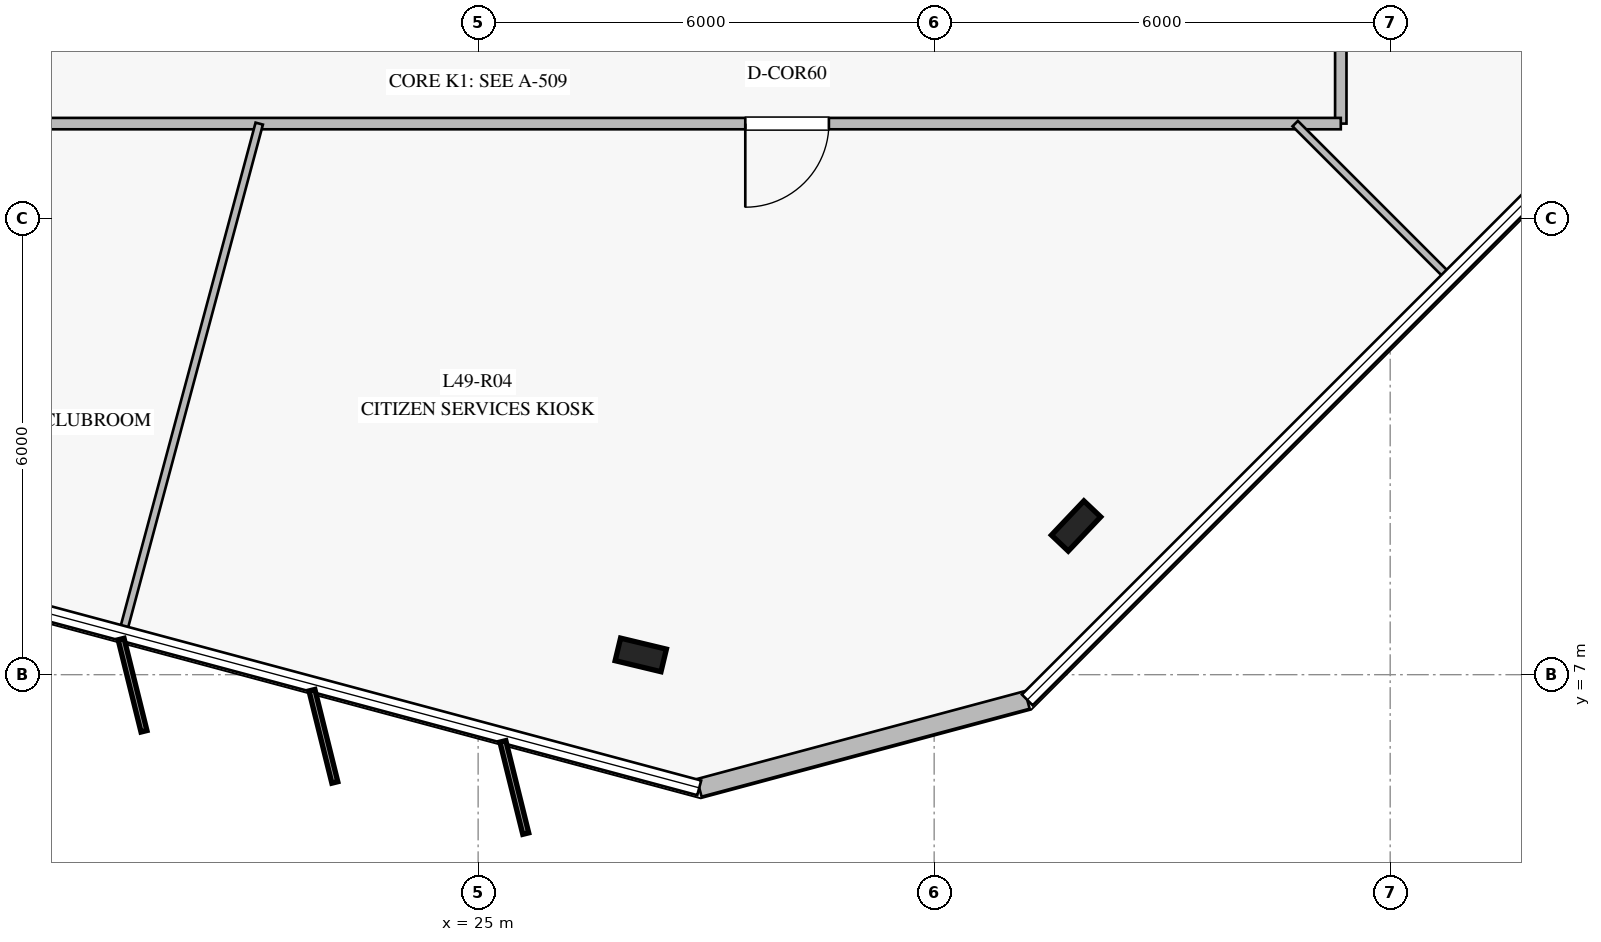
"""IFC4 building model, lengths in metres.
Left out: names, types, materials, properties, quantities, classifications, styles, units other than length and angle.
Written with IfcOpenShell. Run it as: python <this file> out.ifc"""

import sys

from ifc_helpers import new_model, si_unit, direction, frame, frame_2d, origin, origin_2d, place, context, subcontext, project, spatial, rectangle, i_section, extrude, element, fill, save


model = new_model("IFC4")
c1 = context("Model", 3, precision=1e-05, world=origin(), true_north=direction((0.0, 1.0)))
c2 = subcontext(c1, "Body", "Model", "MODEL_VIEW")
j1 = project(units=[si_unit("LENGTHUNIT", "METRE"), si_unit("PLANEANGLEUNIT", "RADIAN")], contexts=[c1])
p1 = place(None, origin())
s1 = spatial("IfcSite", under=j1, at=p1, CompositionType="ELEMENT")
p2 = place(p1, origin())
s2 = spatial("IfcBuilding", under=s1, at=p2, CompositionType="ELEMENT")
p3 = place(p2, frame((0.0, 0.0, 204.8)))
s3 = spatial("IfcBuildingStorey", under=s2, at=p3, CompositionType="ELEMENT", Elevation=204.8)
for number, where, z_axis, x_axis in (
    (1, (27.14, 7.26, 0.0), (0.0, 0.0, 1.0), (-0.972, 0.233, 0.0)),
    (2, (32.867, 8.956, 0.0), (0.0, 0.0, 1.0), (0.688, 0.725, 0.0)),
):
    element("IfcColumn", number, at=place(p3, frame(where, z_axis=z_axis, x_axis=x_axis)), inside=s3, PredefinedType="COLUMN", context=c2, shape_type="SweptSolid", body=[
        extrude(i_section(OverallWidth=0.305, OverallDepth=0.62, WebThickness=0.021, FlangeThickness=0.04, at=origin_2d()), origin(), (0.0, 0.0, 1.0), 4.0),
    ])
p4 = place(p3, frame((27.909, 5.511, 0.0), z_axis=(0.0, 0.0, 1.0), x_axis=(0.965899511245, 0.258917234221, 0.0)))
e3 = element("IfcWall", 3, at=p4, inside=s3, PredefinedType="STANDARD", context=c2, shape_type="SweptSolid", body=[
    extrude(rectangle(XDim=4.469, YDim=0.24, at=frame_2d((2.234, 0.0))), origin(), (0.0, 0.0, 1.0), 3.78),
])
p5 = place(p3, frame((36.35, 35.75, 0.0), z_axis=(0.0, 0.0, 1.0), x_axis=(0.0, -1.0, 0.0)))
e4 = element("IfcWall", 4, at=p5, inside=s3, PredefinedType="PARTITIONING", context=c2, shape_type="SweptSolid", body=[
    extrude(rectangle(XDim=21.5, YDim=0.15, at=frame_2d((10.75, 0.0))), origin(), (0.0, 0.0, 1.0), 3.05),
])
p6 = place(p5, frame((14.717, 0.0, 0.0)))
e5 = element("IfcOpeningElement", 5, at=p6, cuts=e4, PredefinedType="OPENING", context=c2, shape_type="SweptSolid", body=[
    extrude(rectangle(XDim=1.1, YDim=2.2, at=frame_2d((0.55, 1.1))), frame((0.0, 0.085, 0.0), z_axis=(0.0, -1.0, 0.0), x_axis=(1.0, 0.0, 0.0)), (0.0, 0.0, 1.0), 0.17),
])
p7 = place(p3, frame((36.35, 14.25, 0.0), z_axis=(0.0, 0.0, 1.0), x_axis=(-1.0, 0.0, 0.0)))
e6 = element("IfcWall", 6, at=p7, inside=s3, PredefinedType="PARTITIONING", context=c2, shape_type="SweptSolid", body=[
    extrude(rectangle(XDim=22.7, YDim=0.15, at=frame_2d((11.35, 0.0))), origin(), (0.0, 0.0, 1.0), 3.05),
])
p8 = place(p7, frame((17.741, 0.0, 0.0)))
e7 = element("IfcOpeningElement", 7, at=p8, cuts=e6, PredefinedType="OPENING", context=c2, shape_type="SweptSolid", body=[
    extrude(rectangle(XDim=1.1, YDim=2.2, at=frame_2d((0.55, 1.1))), frame((0.0, 0.085, 0.0), z_axis=(0.0, -1.0, 0.0), x_axis=(1.0, 0.0, 0.0)), (0.0, 0.0, 1.0), 0.17),
])
p9 = place(p7, frame((6.735, 0.0, 0.0)))
e8 = element("IfcOpeningElement", 8, at=p9, cuts=e6, PredefinedType="OPENING", context=c2, shape_type="SweptSolid", body=[
    extrude(rectangle(XDim=1.1, YDim=2.2, at=frame_2d((0.55, 1.1))), frame((0.0, 0.085, 0.0), z_axis=(0.0, -1.0, 0.0), x_axis=(1.0, 0.0, 0.0)), (0.0, 0.0, 1.0), 0.17),
])
p10 = place(p3, frame((22.12, 14.25, 0.0), z_axis=(0.0, 0.0, 1.0), x_axis=(-0.258906402321, -0.965902414759, 0.0)))
e9 = element("IfcWall", 9, at=p10, inside=s3, PredefinedType="MOVABLE", context=c2, shape_type="SweptSolid", body=[
    extrude(rectangle(XDim=6.926, YDim=0.1, at=frame_2d((3.463, 0.0))), origin(), (0.0, 0.0, 1.0), 3.18),
])
p11 = place(p3, frame((35.75, 14.25, 0.0), z_axis=(0.0, 0.0, 1.0), x_axis=(0.707106781187, -0.707106781187, 0.0)))
e10 = element("IfcWall", 10, at=p11, inside=s3, PredefinedType="MOVABLE", context=c2, shape_type="SweptSolid", body=[
    extrude(rectangle(XDim=2.851, YDim=0.1, at=frame_2d((1.426, 0.0))), origin(), (0.0, 0.0, 1.0), 3.18),
])
p12 = place(p9, origin())
e11 = element("IfcDoor", 11, at=p12, inside=s3, OperationType="SINGLE_SWING_RIGHT", PredefinedType="DOOR", context=c2, shape_type="SweptSolid", body=[
    extrude(rectangle(XDim=1.1, YDim=2.2, at=frame_2d((0.55, 1.1))), frame((0.0, 0.025, 0.0), z_axis=(0.0, -1.0, 0.0), x_axis=(1.0, 0.0, 0.0)), (0.0, 0.0, 1.0), 0.05),
])
fill(e8, e11)
save(model, sys.argv[1])
